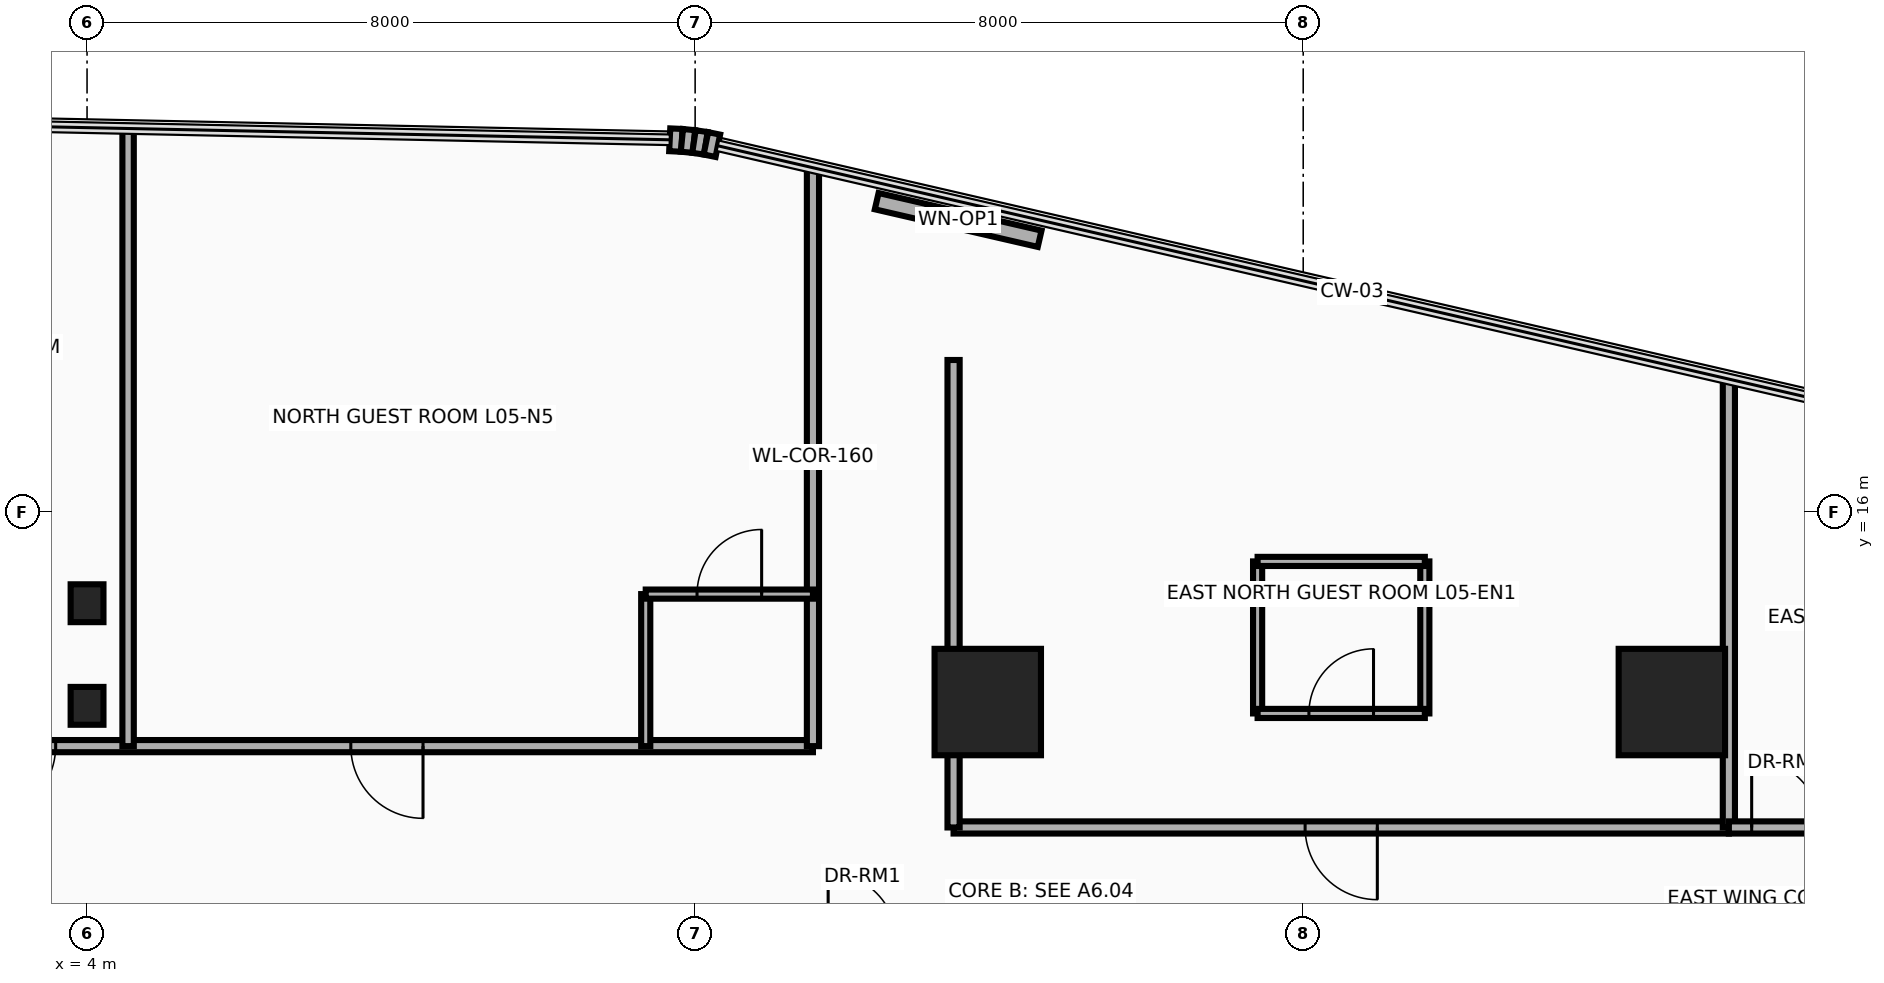
"""IFC4 building model, lengths in metres.
Left out: names, types, materials, properties, quantities, classifications, styles, units other than length and angle.
Written with IfcOpenShell. Run it as: python <this file> out.ifc"""

import sys

from ifc_helpers import new_model, si_unit, direction, frame, frame_2d, origin, origin_2d, place, context, subcontext, project, spatial, rectangle, i_section, extrude, source, transform, mapped, element, fill, save


model = new_model("IFC4")
c1 = context("Model", 3, precision=1e-05, world=origin(), true_north=direction((0.0, 1.0)))
c2 = subcontext(c1, "Body", "Model", "MODEL_VIEW")
j1 = project(units=[si_unit("LENGTHUNIT", "METRE"), si_unit("PLANEANGLEUNIT", "RADIAN")], contexts=[c1])
p1 = place(None, origin())
s1 = spatial("IfcSite", under=j1, at=p1, CompositionType="ELEMENT")
p2 = place(p1, origin())
s2 = spatial("IfcBuilding", under=s1, at=p2, CompositionType="ELEMENT")
p3 = place(p2, frame((0.0, 0.0, 26.0)))
s3 = spatial("IfcBuildingStorey", under=s2, at=p3, CompositionType="ELEMENT", Elevation=26.0)
m1 = source(origin(), c2, "Body", "SweptSolid", [
    extrude(rectangle(XDim=1.4, YDim=1.4, at=origin_2d()), origin(), (0.0, 0.0, 1.0), 3.7),
])
for number, where, z_axis, x_axis in (
    (1, (15.85, 13.5, 0.0), (0.0, 0.0, 1.0), (1.0, 0.0, 0.0)),
    (2, (24.85, 13.5, 0.0), (0.0, 0.0, 1.0), (1.0, 0.0, 0.0)),
):
    element("IfcColumn", number, at=place(p3, frame(where, z_axis=z_axis, x_axis=x_axis)), inside=s3, PredefinedType="COLUMN", context=c2, shape_type="MappedRepresentation", body=[
        mapped(m1, transform((0.0, 0.0, 0.0), x_axis=(1.0, 0.0, 0.0), y_axis=(0.0, 1.0, 0.0), z_axis=(0.0, 0.0, 1.0), scale=1.0)),
    ])
m2 = source(origin(), c2, "Body", "SweptSolid", [
    extrude(i_section(OverallWidth=0.432, OverallDepth=0.498, WebThickness=0.056, FlangeThickness=0.089, at=origin_2d()), origin(), (0.0, 0.0, 1.0), 3.7),
])
for number, where, z_axis, x_axis in (
    (3, (4.0, 13.45, 0.0), (0.0, 0.0, 1.0), (1.0, 0.0, 0.0)),
    (4, (4.0, 14.8, 0.0), (0.0, 0.0, 1.0), (1.0, 0.0, 0.0)),
):
    element("IfcColumn", number, at=place(p3, frame(where, z_axis=z_axis, x_axis=x_axis)), inside=s3, PredefinedType="COLUMN", context=c2, shape_type="MappedRepresentation", body=[
        mapped(m2, transform((0.0, 0.0, 0.0), x_axis=(1.0, 0.0, 0.0), y_axis=(0.0, 1.0, 0.0), z_axis=(0.0, 0.0, 1.0), scale=1.0)),
    ])
p4 = place(p3, frame((11.666, 20.897, 0.0), z_axis=(0.0, 0.0, 1.0), x_axis=(0.998885297239, -0.047203421059, 0.0)))
e5 = element("IfcWall", 5, at=p4, inside=s3, PredefinedType="SOLIDWALL", context=c2, shape_type="SweptSolid", body=[
    extrude(rectangle(XDim=0.16, YDim=0.3, at=frame_2d((0.08, 0.0))), origin(), (0.0, 0.0, 1.0), 3.46),
])
p5 = place(p3, frame((11.826, 20.889, 0.0), z_axis=(0.0, 0.0, 1.0), x_axis=(0.995172891136, -0.098137234257, 0.0)))
e6 = element("IfcWall", 6, at=p5, inside=s3, PredefinedType="SOLIDWALL", context=c2, shape_type="SweptSolid", body=[
    extrude(rectangle(XDim=0.159, YDim=0.3, at=frame_2d((0.08, 0.0))), origin(), (0.0, 0.0, 1.0), 3.46),
])
p6 = place(p3, frame((11.984, 20.874, 0.0), z_axis=(0.0, 0.0, 1.0), x_axis=(0.988846069207, -0.148941100486, 0.0)))
e7 = element("IfcWall", 7, at=p6, inside=s3, PredefinedType="SOLIDWALL", context=c2, shape_type="SweptSolid", body=[
    extrude(rectangle(XDim=0.159, YDim=0.3, at=frame_2d((0.08, 0.0))), origin(), (0.0, 0.0, 1.0), 3.46),
])
p7 = place(p3, frame((12.142, 20.85, 0.0), z_axis=(0.0, 0.0, 1.0), x_axis=(0.979991950448, -0.19903712482, 0.0)))
e8 = element("IfcWall", 8, at=p7, inside=s3, PredefinedType="SOLIDWALL", context=c2, shape_type="SweptSolid", body=[
    extrude(rectangle(XDim=0.161, YDim=0.3, at=frame_2d((0.08, 0.0))), origin(), (0.0, 0.0, 1.0), 3.46),
])
p8 = place(p3, frame((14.389, 20.09, 0.0), z_axis=(0.0, 0.0, 1.0), x_axis=(0.974400545997, -0.224818984875, 0.0)))
e9 = element("IfcWall", 9, at=p8, inside=s3, PredefinedType="SOLIDWALL", context=c2, shape_type="SweptSolid", body=[
    extrude(rectangle(XDim=2.2, YDim=0.22, at=frame_2d((1.1, 0.0))), origin(), (0.0, 0.0, 1.0), 3.46),
])
p9 = place(p8, frame((0.65, 0.0, 0.95)))
e10 = element("IfcOpeningElement", 10, at=p9, cuts=e9, PredefinedType="OPENING", context=c2, shape_type="SweptSolid", body=[
    extrude(rectangle(XDim=0.9, YDim=1.3, at=frame_2d((0.45, 0.65))), frame((0.0, 0.125, 0.0), z_axis=(0.0, -1.0, 0.0), x_axis=(1.0, 0.0, 0.0)), (0.0, 0.0, 1.0), 0.25),
])
p10 = place(p3, frame((-31.89, 12.92, 0.0), z_axis=(0.0, 0.0, 1.0), x_axis=(1.0, 0.0, 0.0)))
e11 = element("IfcWall", 11, at=p10, inside=s3, PredefinedType="PARTITIONING", context=c2, shape_type="SweptSolid", body=[
    extrude(rectangle(XDim=45.44, YDim=0.16, at=frame_2d((22.72, 0.0))), origin(), (0.0, 0.0, 1.0), 2.583),
])
p11 = place(p10, frame((4.225, 0.0, 0.0)))
e12 = element("IfcOpeningElement", 12, at=p11, cuts=e11, PredefinedType="OPENING", context=c2, shape_type="SweptSolid", body=[
    extrude(rectangle(XDim=0.95, YDim=2.15, at=frame_2d((0.475, 1.075))), frame((0.0, 0.095, 0.0), z_axis=(0.0, -1.0, 0.0), x_axis=(1.0, 0.0, 0.0)), (0.0, 0.0, 1.0), 0.19),
])
p12 = place(p10, frame((13.43, 0.0, 0.0)))
e13 = element("IfcOpeningElement", 13, at=p12, cuts=e11, PredefinedType="OPENING", context=c2, shape_type="SweptSolid", body=[
    extrude(rectangle(XDim=0.95, YDim=2.15, at=frame_2d((0.475, 1.075))), frame((0.0, 0.095, 0.0), z_axis=(0.0, -1.0, 0.0), x_axis=(1.0, 0.0, 0.0)), (0.0, 0.0, 1.0), 0.19),
])
p13 = place(p10, frame((20.31, 0.0, 0.0)))
e14 = element("IfcOpeningElement", 14, at=p13, cuts=e11, PredefinedType="OPENING", context=c2, shape_type="SweptSolid", body=[
    extrude(rectangle(XDim=0.95, YDim=2.15, at=frame_2d((0.475, 1.075))), frame((0.0, 0.095, 0.0), z_axis=(0.0, -1.0, 0.0), x_axis=(1.0, 0.0, 0.0)), (0.0, 0.0, 1.0), 0.19),
])
p14 = place(p10, frame((25.517, 0.0, 0.0)))
e15 = element("IfcOpeningElement", 15, at=p14, cuts=e11, PredefinedType="OPENING", context=c2, shape_type="SweptSolid", body=[
    extrude(rectangle(XDim=0.95, YDim=2.15, at=frame_2d((0.475, 1.075))), frame((0.0, 0.095, 0.0), z_axis=(0.0, -1.0, 0.0), x_axis=(1.0, 0.0, 0.0)), (0.0, 0.0, 1.0), 0.19),
])
p15 = place(p10, frame((28.373, 0.0, 0.0)))
e16 = element("IfcOpeningElement", 16, at=p15, cuts=e11, PredefinedType="OPENING", context=c2, shape_type="SweptSolid", body=[
    extrude(rectangle(XDim=0.95, YDim=2.15, at=frame_2d((0.475, 1.075))), frame((0.0, 0.095, 0.0), z_axis=(0.0, -1.0, 0.0), x_axis=(1.0, 0.0, 0.0)), (0.0, 0.0, 1.0), 0.19),
])
p16 = place(p10, frame((34.527, 0.0, 0.0)))
e17 = element("IfcOpeningElement", 17, at=p16, cuts=e11, PredefinedType="OPENING", context=c2, shape_type="SweptSolid", body=[
    extrude(rectangle(XDim=0.95, YDim=2.15, at=frame_2d((0.475, 1.075))), frame((0.0, 0.095, 0.0), z_axis=(0.0, -1.0, 0.0), x_axis=(1.0, 0.0, 0.0)), (0.0, 0.0, 1.0), 0.19),
])
p17 = place(p10, frame((39.36, 0.0, 0.0)))
e18 = element("IfcOpeningElement", 18, at=p17, cuts=e11, PredefinedType="OPENING", context=c2, shape_type="SweptSolid", body=[
    extrude(rectangle(XDim=0.95, YDim=2.15, at=frame_2d((0.475, 1.075))), frame((0.0, 0.095, 0.0), z_axis=(0.0, -1.0, 0.0), x_axis=(1.0, 0.0, 0.0)), (0.0, 0.0, 1.0), 0.19),
])
p18 = place(p3, frame((13.55, 12.92, 0.0), z_axis=(0.0, 0.0, 1.0), x_axis=(0.0, 1.0, 0.0)))
e19 = element("IfcWall", 19, at=p18, inside=s3, PredefinedType="PARTITIONING", context=c2, shape_type="SweptSolid", body=[
    extrude(rectangle(XDim=7.609, YDim=0.16, at=frame_2d((3.805, 0.0))), origin(), (0.0, 0.0, 1.0), 2.583),
])
p19 = place(p3, frame((4.54, 12.92, 0.0), z_axis=(0.0, 0.0, 1.0), x_axis=(0.0, 1.0, 0.0)))
e20 = element("IfcWall", 20, at=p19, inside=s3, PredefinedType="PARTITIONING", context=c2, shape_type="SweptSolid", body=[
    extrude(rectangle(XDim=8.125, YDim=0.15, at=frame_2d((4.063, 0.0))), origin(), (0.0, 0.0, 1.0), 2.583),
])
p20 = place(p3, frame((11.35, 12.92, 0.0), z_axis=(0.0, 0.0, 1.0), x_axis=(0.0, 1.0, 0.0)))
e21 = element("IfcWall", 21, at=p20, inside=s3, PredefinedType="PARTITIONING", context=c2, shape_type="SweptSolid", body=[
    extrude(rectangle(XDim=2.0, YDim=0.12, at=frame_2d((1.0, 0.0))), origin(), (0.0, 0.0, 1.0), 2.583),
])
p21 = place(p3, frame((11.35, 14.92, 0.0), z_axis=(0.0, 0.0, 1.0), x_axis=(1.0, 0.0, 0.0)))
e22 = element("IfcWall", 22, at=p21, inside=s3, PredefinedType="PARTITIONING", context=c2, shape_type="SweptSolid", body=[
    extrude(rectangle(XDim=2.2, YDim=0.12, at=frame_2d((1.1, 0.0))), origin(), (0.0, 0.0, 1.0), 3.46),
])
p22 = place(p21, frame((0.675, 0.0, 0.0)))
e23 = element("IfcOpeningElement", 23, at=p22, cuts=e22, PredefinedType="OPENING", context=c2, shape_type="SweptSolid", body=[
    extrude(rectangle(XDim=0.85, YDim=2.1, at=frame_2d((0.425, 1.05))), frame((0.0, 0.075, 0.0), z_axis=(0.0, -1.0, 0.0), x_axis=(1.0, 0.0, 0.0)), (0.0, 0.0, 1.0), 0.15),
])
p23 = place(p3, frame((15.4, 11.85, 0.0), z_axis=(0.0, 0.0, 1.0), x_axis=(1.0, 0.0, 0.0)))
e24 = element("IfcWall", 24, at=p23, inside=s3, PredefinedType="PARTITIONING", context=c2, shape_type="SweptSolid", body=[
    extrude(rectangle(XDim=10.2, YDim=0.16, at=frame_2d((5.1, 0.0))), origin(), (0.0, 0.0, 1.0), 2.834),
])
p24 = place(p23, frame((4.625, 0.0, 0.0)))
e25 = element("IfcOpeningElement", 25, at=p24, cuts=e24, PredefinedType="OPENING", context=c2, shape_type="SweptSolid", body=[
    extrude(rectangle(XDim=0.95, YDim=2.15, at=frame_2d((0.475, 1.075))), frame((0.0, 0.095, 0.0), z_axis=(0.0, -1.0, 0.0), x_axis=(1.0, 0.0, 0.0)), (0.0, 0.0, 1.0), 0.19),
])
p25 = place(p3, frame((15.4, 11.85, 0.0), z_axis=(0.0, 0.0, 1.0), x_axis=(0.0, 1.0, 0.0)))
e26 = element("IfcWall", 26, at=p25, inside=s3, PredefinedType="PARTITIONING", context=c2, shape_type="SweptSolid", body=[
    extrude(rectangle(XDim=6.15, YDim=0.16, at=frame_2d((3.075, 0.0))), origin(), (0.0, 0.0, 1.0), 2.583),
])
p26 = place(p3, frame((25.6, 11.85, 0.0), z_axis=(0.0, 0.0, 1.0), x_axis=(0.0, 1.0, 0.0)))
e27 = element("IfcWall", 27, at=p26, inside=s3, PredefinedType="PARTITIONING", context=c2, shape_type="SweptSolid", body=[
    extrude(rectangle(XDim=5.898, YDim=0.16, at=frame_2d((2.949, 0.0))), origin(), (0.0, 0.0, 1.0), 2.583),
])
for number, where, z_axis, x_axis in (
    (28, (19.4, 13.35, 0.0), (0.0, 0.0, 1.0), (0.0, 1.0, 0.0)),
    (29, (21.6, 13.35, 0.0), (0.0, 0.0, 1.0), (0.0, 1.0, 0.0)),
):
    element("IfcWall", number, at=place(p3, frame(where, z_axis=z_axis, x_axis=x_axis)), inside=s3, PredefinedType="PARTITIONING", context=c2, shape_type="SweptSolid", body=[
        extrude(rectangle(XDim=2.0, YDim=0.12, at=frame_2d((1.0, 0.0))), origin(), (0.0, 0.0, 1.0), 2.583),
    ])
p27 = place(p3, frame((19.4, 15.35, 0.0), z_axis=(0.0, 0.0, 1.0), x_axis=(1.0, 0.0, 0.0)))
e30 = element("IfcWall", 30, at=p27, inside=s3, PredefinedType="PARTITIONING", context=c2, shape_type="SweptSolid", body=[
    extrude(rectangle(XDim=2.2, YDim=0.12, at=frame_2d((1.1, 0.0))), origin(), (0.0, 0.0, 1.0), 3.46),
])
p28 = place(p3, frame((19.4, 13.35, 0.0), z_axis=(0.0, 0.0, 1.0), x_axis=(1.0, 0.0, 0.0)))
e31 = element("IfcWall", 31, at=p28, inside=s3, PredefinedType="PARTITIONING", context=c2, shape_type="SweptSolid", body=[
    extrude(rectangle(XDim=2.2, YDim=0.12, at=frame_2d((1.1, 0.0))), origin(), (0.0, 0.0, 1.0), 2.583),
])
p29 = place(p28, frame((0.675, 0.0, 0.0)))
e32 = element("IfcOpeningElement", 32, at=p29, cuts=e31, PredefinedType="OPENING", context=c2, shape_type="SweptSolid", body=[
    extrude(rectangle(XDim=0.85, YDim=2.1, at=frame_2d((0.425, 1.05))), frame((0.0, 0.075, 0.0), z_axis=(0.0, -1.0, 0.0), x_axis=(1.0, 0.0, 0.0)), (0.0, 0.0, 1.0), 0.15),
])
p30 = place(p3, frame((25.6, 11.85, 0.0), z_axis=(0.0, 0.0, 1.0), x_axis=(1.0, 0.0, 0.0)))
e33 = element("IfcWall", 33, at=p30, inside=s3, PredefinedType="PARTITIONING", context=c2, shape_type="SweptSolid", body=[
    extrude(rectangle(XDim=5.79, YDim=0.16, at=frame_2d((2.895, 0.0))), origin(), (0.0, 0.0, 1.0), 2.896),
])
p31 = place(p30, frame((0.3, 0.0, 0.0)))
e34 = element("IfcOpeningElement", 34, at=p31, cuts=e33, PredefinedType="OPENING", context=c2, shape_type="SweptSolid", body=[
    extrude(rectangle(XDim=0.9, YDim=2.1, at=frame_2d((0.45, 1.05))), frame((0.0, 0.095, 0.0), z_axis=(0.0, -1.0, 0.0), x_axis=(1.0, 0.0, 0.0)), (0.0, 0.0, 1.0), 0.19),
])
p32 = place(p9, origin())
e35 = element("IfcWindow", 35, at=p32, inside=s3, PartitioningType="SINGLE_PANEL", PredefinedType="WINDOW", context=c2, shape_type="SweptSolid", body=[
    extrude(rectangle(XDim=0.9, YDim=1.3, at=frame_2d((0.45, 0.65))), frame((0.0, 0.03, 0.0), z_axis=(0.0, -1.0, 0.0), x_axis=(1.0, 0.0, 0.0)), (0.0, 0.0, 1.0), 0.06),
])
fill(e10, e35)
p33 = place(p16, frame((0.95, 0.0, 0.0), z_axis=(0.0, 0.0, 1.0), x_axis=(-1.0, 0.0, 0.0)))
e36 = element("IfcDoor", 36, at=p33, inside=s3, OperationType="SINGLE_SWING_LEFT", PredefinedType="DOOR", context=c2, shape_type="SweptSolid", body=[
    extrude(rectangle(XDim=0.95, YDim=2.15, at=frame_2d((0.475, 1.075))), frame((0.0, 0.025, 0.0), z_axis=(0.0, -1.0, 0.0), x_axis=(1.0, 0.0, 0.0)), (0.0, 0.0, 1.0), 0.05),
])
fill(e17, e36)
p34 = place(p17, frame((0.95, 0.0, 0.0), z_axis=(0.0, 0.0, 1.0), x_axis=(-1.0, 0.0, 0.0)))
e37 = element("IfcDoor", 37, at=p34, inside=s3, OperationType="SINGLE_SWING_LEFT", PredefinedType="DOOR", context=c2, shape_type="SweptSolid", body=[
    extrude(rectangle(XDim=0.95, YDim=2.15, at=frame_2d((0.475, 1.075))), frame((0.0, 0.025, 0.0), z_axis=(0.0, -1.0, 0.0), x_axis=(1.0, 0.0, 0.0)), (0.0, 0.0, 1.0), 0.05),
])
fill(e18, e37)
p35 = place(p22, origin())
e38 = element("IfcDoor", 38, at=p35, inside=s3, OperationType="SINGLE_SWING_RIGHT", PredefinedType="DOOR", context=c2, shape_type="SweptSolid", body=[
    extrude(rectangle(XDim=0.85, YDim=2.1, at=frame_2d((0.425, 1.05))), frame((0.0, 0.025, 0.0), z_axis=(0.0, -1.0, 0.0), x_axis=(1.0, 0.0, 0.0)), (0.0, 0.0, 1.0), 0.05),
])
fill(e23, e38)
p36 = place(p24, frame((0.95, 0.0, 0.0), z_axis=(0.0, 0.0, 1.0), x_axis=(-1.0, 0.0, 0.0)))
e39 = element("IfcDoor", 39, at=p36, inside=s3, OperationType="SINGLE_SWING_LEFT", PredefinedType="DOOR", context=c2, shape_type="SweptSolid", body=[
    extrude(rectangle(XDim=0.95, YDim=2.15, at=frame_2d((0.475, 1.075))), frame((0.0, 0.025, 0.0), z_axis=(0.0, -1.0, 0.0), x_axis=(1.0, 0.0, 0.0)), (0.0, 0.0, 1.0), 0.05),
])
fill(e25, e39)
p37 = place(p29, origin())
e40 = element("IfcDoor", 40, at=p37, inside=s3, OperationType="SINGLE_SWING_RIGHT", PredefinedType="DOOR", context=c2, shape_type="SweptSolid", body=[
    extrude(rectangle(XDim=0.85, YDim=2.1, at=frame_2d((0.425, 1.05))), frame((0.0, 0.025, 0.0), z_axis=(0.0, -1.0, 0.0), x_axis=(1.0, 0.0, 0.0)), (0.0, 0.0, 1.0), 0.05),
])
fill(e32, e40)
p38 = place(p31, origin())
e41 = element("IfcDoor", 41, at=p38, inside=s3, OperationType="SINGLE_SWING_LEFT", PredefinedType="DOOR", context=c2, shape_type="SweptSolid", body=[
    extrude(rectangle(XDim=0.9, YDim=2.1, at=frame_2d((0.45, 1.05))), frame((0.0, 0.025, 0.0), z_axis=(0.0, -1.0, 0.0), x_axis=(1.0, 0.0, 0.0)), (0.0, 0.0, 1.0), 0.05),
])
fill(e34, e41)
save(model, sys.argv[1])
